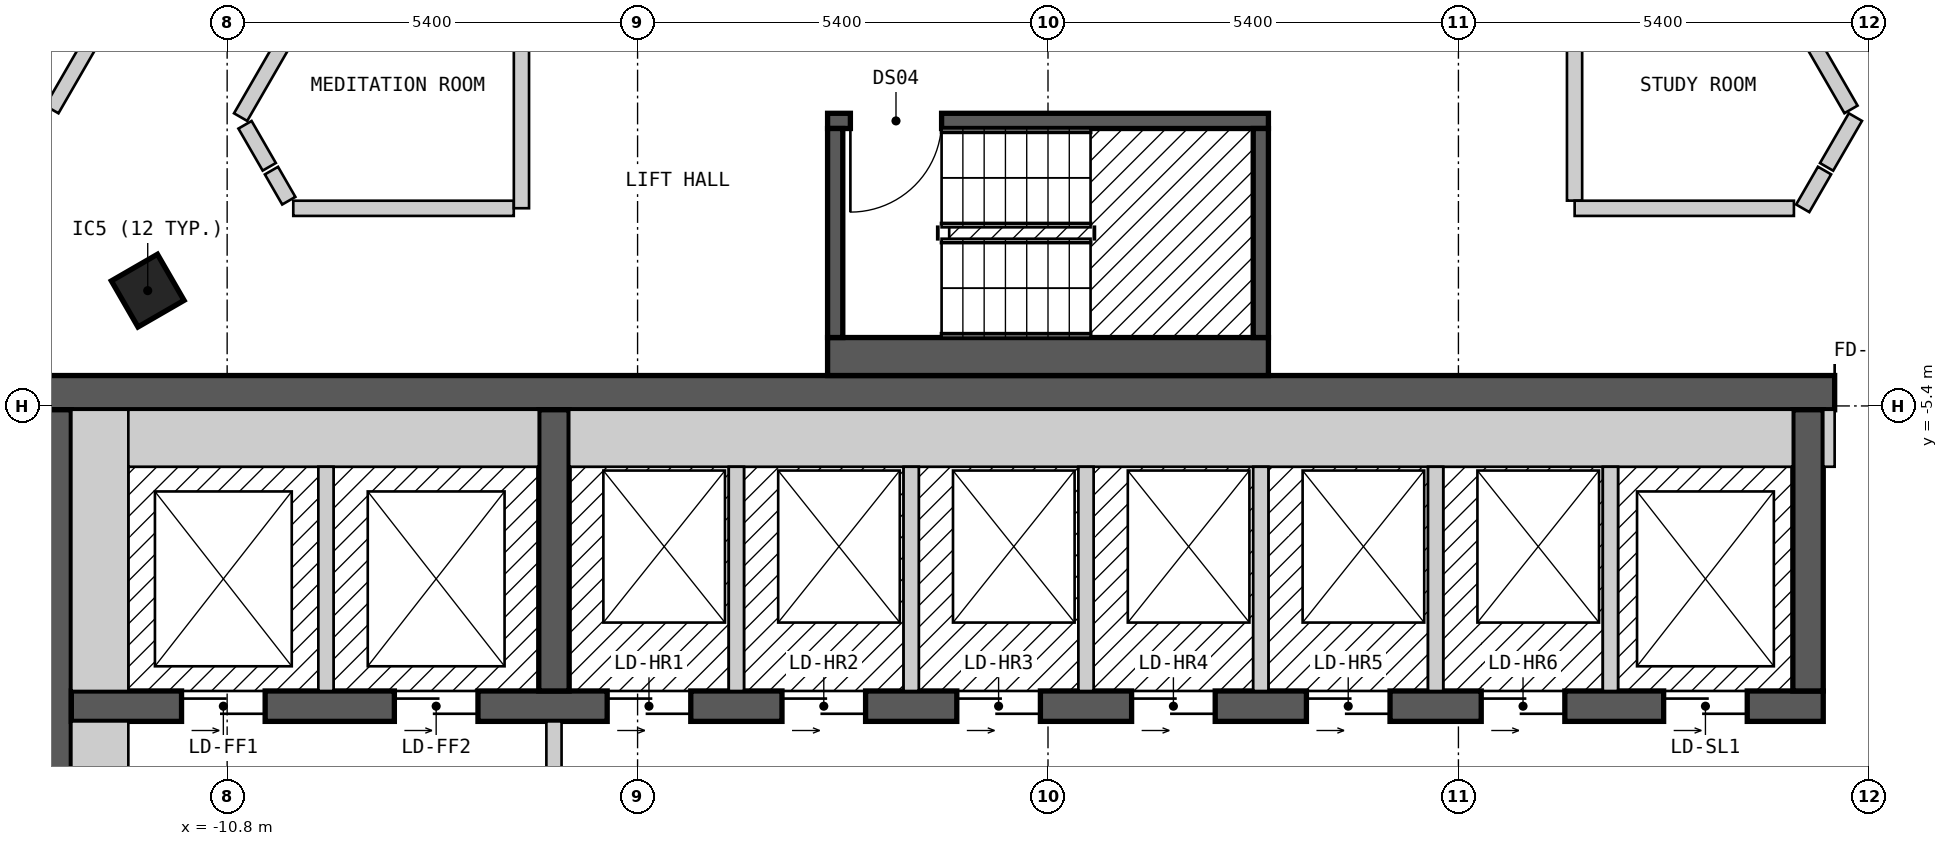
"""IFC4 building model, lengths in metres.
Left out: names, types, materials, properties, quantities, classifications, styles, units other than length and angle.
Written with IfcOpenShell. Run it as: python <this file> out.ifc"""

import sys

from ifc_helpers import new_model, si_unit, direction, frame, frame_2d, origin, origin_2d, place, context, subcontext, project, spatial, rectangle, extrude, element, fill, save


model = new_model("IFC4")
c1 = context("Model", 3, precision=1e-05, world=origin(), true_north=direction((0.0, 1.0)))
c2 = subcontext(c1, "Body", "Model", "MODEL_VIEW")
j1 = project(units=[si_unit("LENGTHUNIT", "METRE"), si_unit("PLANEANGLEUNIT", "RADIAN")], contexts=[c1])
p1 = place(None, origin())
s1 = spatial("IfcSite", under=j1, at=p1, CompositionType="ELEMENT")
p2 = place(p1, origin())
s2 = spatial("IfcBuilding", under=s1, at=p2, CompositionType="ELEMENT")
p3 = place(p2, frame((0.0, 0.0, 220.8)))
s3 = spatial("IfcBuildingStorey", under=s2, at=p3, CompositionType="ELEMENT", Elevation=220.8)
p4 = place(p3, frame((-11.845, -3.883, 0.0), z_axis=(0.0, 0.0, 1.0), x_axis=(0.499984884929, -0.866034130299, 0.0)))
e1 = element("IfcColumn", 1, at=p4, inside=s3, PredefinedType="COLUMN", context=c2, shape_type="SweptSolid", body=[
    extrude(rectangle(XDim=0.7, YDim=0.7, at=origin_2d()), origin(), (0.0, 0.0, 1.0), 3.0),
])
p5 = place(p3, frame((-13.3, -5.225, 0.0), z_axis=(0.0, 0.0, 1.0), x_axis=(1.0, 0.0, 0.0)))
e2 = element("IfcWall", 2, at=p5, inside=s3, PredefinedType="SHEAR", context=c2, shape_type="SweptSolid", body=[
    extrude(rectangle(XDim=26.6, YDim=0.45, at=frame_2d((13.3, 0.0))), origin(), (0.0, 0.0, 1.0), 2.7),
])
p6 = place(p5, frame((23.65, 0.0, 0.0)))
e3 = element("IfcOpeningElement", 3, at=p6, cuts=e2, PredefinedType="OPENING", context=c2, shape_type="SweptSolid", body=[
    extrude(rectangle(XDim=1.2, YDim=2.1, at=frame_2d((0.6, 1.05))), frame((0.0, 0.235, 0.0), z_axis=(0.0, -1.0, 0.0), x_axis=(1.0, 0.0, 0.0)), (0.0, 0.0, 1.0), 0.47),
])
p7 = place(p3, frame((-13.075, -18.55, 0.0), z_axis=(0.0, 0.0, 1.0), x_axis=(0.0, 1.0, 0.0)))
e4 = element("IfcWall", 4, at=p7, inside=s3, PredefinedType="SHEAR", context=c2, shape_type="SweptSolid", body=[
    extrude(rectangle(XDim=13.1, YDim=0.45, at=frame_2d((6.55, 0.0))), origin(), (0.0, 0.0, 1.0), 2.7),
])
p8 = place(p7, frame((4.35, 0.0, 0.0)))
e5 = element("IfcOpeningElement", 5, at=p8, cuts=e4, PredefinedType="OPENING", context=c2, shape_type="SweptSolid", body=[
    extrude(rectangle(XDim=1.2, YDim=2.1, at=frame_2d((0.6, 1.05))), frame((0.0, 0.235, 0.0), z_axis=(0.0, -1.0, 0.0), x_axis=(1.0, 0.0, 0.0)), (0.0, 0.0, 1.0), 0.47),
])
p9 = place(p3, frame((-12.85, -9.35, 0.0), z_axis=(0.0, 0.0, 1.0), x_axis=(1.0, 0.0, 0.0)))
e6 = element("IfcWall", 6, at=p9, inside=s3, PredefinedType="SHEAR", context=c2, shape_type="SweptSolid", body=[
    extrude(rectangle(XDim=23.05, YDim=0.4, at=frame_2d((11.525, 0.0))), origin(), (0.0, 0.0, 1.0), 2.7),
])
p10 = place(p9, frame((1.45, 0.0, 0.0)))
e7 = element("IfcOpeningElement", 7, at=p10, cuts=e6, PredefinedType="OPENING", context=c2, shape_type="SweptSolid", body=[
    extrude(rectangle(XDim=1.1, YDim=2.1, at=frame_2d((0.55, 1.05))), frame((0.0, 0.21, 0.0), z_axis=(0.0, -1.0, 0.0), x_axis=(1.0, 0.0, 0.0)), (0.0, 0.0, 1.0), 0.42),
])
p11 = place(p9, frame((4.25, 0.0, 0.0)))
e8 = element("IfcOpeningElement", 8, at=p11, cuts=e6, PredefinedType="OPENING", context=c2, shape_type="SweptSolid", body=[
    extrude(rectangle(XDim=1.1, YDim=2.1, at=frame_2d((0.55, 1.05))), frame((0.0, 0.21, 0.0), z_axis=(0.0, -1.0, 0.0), x_axis=(1.0, 0.0, 0.0)), (0.0, 0.0, 1.0), 0.42),
])
p12 = place(p9, frame((7.05, 0.0, 0.0)))
e9 = element("IfcOpeningElement", 9, at=p12, cuts=e6, PredefinedType="OPENING", context=c2, shape_type="SweptSolid", body=[
    extrude(rectangle(XDim=1.1, YDim=2.1, at=frame_2d((0.55, 1.05))), frame((0.0, 0.21, 0.0), z_axis=(0.0, -1.0, 0.0), x_axis=(1.0, 0.0, 0.0)), (0.0, 0.0, 1.0), 0.42),
])
p13 = place(p9, frame((9.35, 0.0, 0.0)))
e10 = element("IfcOpeningElement", 10, at=p13, cuts=e6, PredefinedType="OPENING", context=c2, shape_type="SweptSolid", body=[
    extrude(rectangle(XDim=1.1, YDim=2.1, at=frame_2d((0.55, 1.05))), frame((0.0, 0.21, 0.0), z_axis=(0.0, -1.0, 0.0), x_axis=(1.0, 0.0, 0.0)), (0.0, 0.0, 1.0), 0.42),
])
p14 = place(p9, frame((11.65, 0.0, 0.0)))
e11 = element("IfcOpeningElement", 11, at=p14, cuts=e6, PredefinedType="OPENING", context=c2, shape_type="SweptSolid", body=[
    extrude(rectangle(XDim=1.1, YDim=2.1, at=frame_2d((0.55, 1.05))), frame((0.0, 0.21, 0.0), z_axis=(0.0, -1.0, 0.0), x_axis=(1.0, 0.0, 0.0)), (0.0, 0.0, 1.0), 0.42),
])
p15 = place(p9, frame((13.95, 0.0, 0.0)))
e12 = element("IfcOpeningElement", 12, at=p15, cuts=e6, PredefinedType="OPENING", context=c2, shape_type="SweptSolid", body=[
    extrude(rectangle(XDim=1.1, YDim=2.1, at=frame_2d((0.55, 1.05))), frame((0.0, 0.21, 0.0), z_axis=(0.0, -1.0, 0.0), x_axis=(1.0, 0.0, 0.0)), (0.0, 0.0, 1.0), 0.42),
])
p16 = place(p9, frame((16.25, 0.0, 0.0)))
e13 = element("IfcOpeningElement", 13, at=p16, cuts=e6, PredefinedType="OPENING", context=c2, shape_type="SweptSolid", body=[
    extrude(rectangle(XDim=1.1, YDim=2.1, at=frame_2d((0.55, 1.05))), frame((0.0, 0.21, 0.0), z_axis=(0.0, -1.0, 0.0), x_axis=(1.0, 0.0, 0.0)), (0.0, 0.0, 1.0), 0.42),
])
p17 = place(p9, frame((18.55, 0.0, 0.0)))
e14 = element("IfcOpeningElement", 14, at=p17, cuts=e6, PredefinedType="OPENING", context=c2, shape_type="SweptSolid", body=[
    extrude(rectangle(XDim=1.1, YDim=2.1, at=frame_2d((0.55, 1.05))), frame((0.0, 0.21, 0.0), z_axis=(0.0, -1.0, 0.0), x_axis=(1.0, 0.0, 0.0)), (0.0, 0.0, 1.0), 0.42),
])
p18 = place(p9, frame((20.95, 0.0, 0.0)))
e15 = element("IfcOpeningElement", 15, at=p18, cuts=e6, PredefinedType="OPENING", context=c2, shape_type="SweptSolid", body=[
    extrude(rectangle(XDim=1.1, YDim=2.1, at=frame_2d((0.55, 1.05))), frame((0.0, 0.21, 0.0), z_axis=(0.0, -1.0, 0.0), x_axis=(1.0, 0.0, 0.0)), (0.0, 0.0, 1.0), 0.42),
])
for number, where, z_axis, x_axis in (
    (16, (-6.5, -9.15, 0.0), (0.0, 0.0, 1.0), (0.0, 1.0, 0.0)),
    (17, (10.0, -9.15, 0.0), (0.0, 0.0, 1.0), (0.0, 1.0, 0.0)),
):
    element("IfcWall", number, at=place(p3, frame(where, z_axis=z_axis, x_axis=x_axis)), inside=s3, PredefinedType="SHEAR", context=c2, shape_type="SweptSolid", body=[
        extrude(rectangle(XDim=3.7, YDim=0.4, at=frame_2d((1.85, 0.0))), origin(), (0.0, 0.0, 1.0), 2.7),
    ])
p19 = place(p3, frame((-2.9, -4.75, 0.0), z_axis=(0.0, 0.0, 1.0), x_axis=(1.0, 0.0, 0.0)))
e18 = element("IfcWall", 18, at=p19, inside=s3, PredefinedType="SOLIDWALL", context=c2, shape_type="SweptSolid", body=[
    extrude(rectangle(XDim=5.8, YDim=0.5, at=frame_2d((2.9, 0.0))), origin(), (0.0, 0.0, 1.0), 2.7),
])
p20 = place(p3, frame((-2.9, -1.65, 0.0), z_axis=(0.0, 0.0, 1.0), x_axis=(1.0, 0.0, 0.0)))
e19 = element("IfcWall", 19, at=p20, inside=s3, PredefinedType="SOLIDWALL", context=c2, shape_type="SweptSolid", body=[
    extrude(rectangle(XDim=5.8, YDim=0.2, at=frame_2d((2.9, 0.0))), origin(), (0.0, 0.0, 1.0), 2.7),
])
p21 = place(p20, frame((0.3, 0.0, 0.0)))
e20 = element("IfcOpeningElement", 20, at=p21, cuts=e19, PredefinedType="OPENING", context=c2, shape_type="SweptSolid", body=[
    extrude(rectangle(XDim=1.2, YDim=2.1, at=frame_2d((0.6, 1.05))), frame((0.0, 0.11, 0.0), z_axis=(0.0, -1.0, 0.0), x_axis=(1.0, 0.0, 0.0)), (0.0, 0.0, 1.0), 0.22),
])
for number, where, z_axis, x_axis in (
    (21, (-2.8, -4.5, 0.0), (0.0, 0.0, 1.0), (0.0, 1.0, 0.0)),
    (22, (2.8, -4.5, 0.0), (0.0, 0.0, 1.0), (0.0, 1.0, 0.0)),
):
    element("IfcWall", number, at=place(p3, frame(where, z_axis=z_axis, x_axis=x_axis)), inside=s3, PredefinedType="SOLIDWALL", context=c2, shape_type="SweptSolid", body=[
        extrude(rectangle(XDim=2.75, YDim=0.2, at=frame_2d((1.375, 0.0))), origin(), (0.0, 0.0, 1.0), 2.7),
    ])
p22 = place(p3, frame((-10.565, -1.701, 0.0), z_axis=(0.0, 0.0, 1.0), x_axis=(0.499512735409, -0.866306543416, 0.0)))
e23 = element("IfcWall", 23, at=p22, inside=s3, PredefinedType="PARTITIONING", context=c2, shape_type="SweptSolid", body=[
    extrude(rectangle(XDim=0.638, YDim=0.2, at=frame_2d((0.319, 0.0))), origin(), (0.0, 0.0, 1.0), 2.7),
])
p23 = place(p3, frame((-10.217, -2.304, 0.0), z_axis=(0.0, 0.0, 1.0), x_axis=(0.499013081552, -0.866594452117, 0.0)))
e24 = element("IfcWall", 24, at=p23, inside=s3, PredefinedType="PARTITIONING", context=c2, shape_type="SweptSolid", body=[
    extrude(rectangle(XDim=0.457, YDim=0.2, at=frame_2d((0.229, 0.0))), origin(), (0.0, 0.0, 1.0), 2.7),
])
p24 = place(p3, frame((8.026, 2.899, 0.0), z_axis=(0.0, 0.0, 1.0), x_axis=(0.499986018985, -0.866033475577, 0.0)))
e25 = element("IfcWall", 25, at=p24, inside=s3, PredefinedType="PARTITIONING", context=c2, shape_type="SweptSolid", body=[
    extrude(rectangle(XDim=5.078, YDim=0.2, at=frame_2d((2.539, 0.0))), origin(), (0.0, 0.0, 1.0), 2.7),
])
p25 = place(p24, frame((2.089, 0.0, 0.0)))
e26 = element("IfcOpeningElement", 26, at=p25, cuts=e25, PredefinedType="OPENING", context=c2, shape_type="SweptSolid", body=[
    extrude(rectangle(XDim=0.9, YDim=2.1, at=frame_2d((0.45, 1.05))), frame((0.0, 0.11, 0.0), z_axis=(0.0, -1.0, 0.0), x_axis=(1.0, 0.0, 0.0)), (0.0, 0.0, 1.0), 0.22),
])
p26 = place(p3, frame((9.238, 5.2, 0.0), z_axis=(0.0, 0.0, 1.0), x_axis=(0.500025705601, -0.86601056214, 0.0)))
e27 = element("IfcWall", 27, at=p26, inside=s3, PredefinedType="PARTITIONING", context=c2, shape_type="SweptSolid", body=[
    extrude(rectangle(XDim=7.735, YDim=0.2, at=frame_2d((3.868, 0.0))), origin(), (0.0, 0.0, 1.0), 2.7),
])
p27 = place(p3, frame((6.928, 1.0, 0.0), z_axis=(0.0, 0.0, 1.0), x_axis=(0.0, -1.0, 0.0)))
e28 = element("IfcWall", 28, at=p27, inside=s3, PredefinedType="PARTITIONING", context=c2, shape_type="SweptSolid", body=[
    extrude(rectangle(XDim=3.699, YDim=0.2, at=frame_2d((1.85, 0.0))), origin(), (0.0, 0.0, 1.0), 2.7),
])
p28 = place(p3, frame((-9.93, -2.8, 0.0), z_axis=(0.0, 0.0, 1.0), x_axis=(1.0, 0.0, 0.0)))
e29 = element("IfcWall", 29, at=p28, inside=s3, PredefinedType="PARTITIONING", context=c2, shape_type="SweptSolid", body=[
    extrude(rectangle(XDim=2.901, YDim=0.2, at=frame_2d((1.45, 0.0))), origin(), (0.0, 0.0, 1.0), 2.7),
])
p29 = place(p3, frame((6.929, -2.8, 0.0), z_axis=(0.0, 0.0, 1.0), x_axis=(1.0, 0.0, 0.0)))
e30 = element("IfcWall", 30, at=p29, inside=s3, PredefinedType="PARTITIONING", context=c2, shape_type="SweptSolid", body=[
    extrude(rectangle(XDim=2.885, YDim=0.2, at=frame_2d((1.442, 0.0))), origin(), (0.0, 0.0, 1.0), 2.7),
])
p30 = place(p3, frame((9.93, -2.8, 0.0), z_axis=(0.0, 0.0, 1.0), x_axis=(0.500164219654, 0.865930570761, 0.0)))
e31 = element("IfcWall", 31, at=p30, inside=s3, PredefinedType="PARTITIONING", context=c2, shape_type="SweptSolid", body=[
    extrude(rectangle(XDim=0.574, YDim=0.2, at=frame_2d((0.287, 0.0))), origin(), (0.0, 0.0, 1.0), 2.7),
])
p31 = place(p3, frame((10.244, -2.255, 0.0), z_axis=(0.0, 0.0, 1.0), x_axis=(0.50109986513, 0.865389464442, 0.0)))
e32 = element("IfcWall", 32, at=p31, inside=s3, PredefinedType="PARTITIONING", context=c2, shape_type="SweptSolid", body=[
    extrude(rectangle(XDim=0.757, YDim=0.2, at=frame_2d((0.378, 0.0))), origin(), (0.0, 0.0, 1.0), 2.7),
])
p32 = place(p3, frame((-10.623, -1.6, 0.0), z_axis=(0.0, 0.0, 1.0), x_axis=(0.500040865889, 0.866001808567, 0.0)))
e33 = element("IfcWall", 33, at=p32, inside=s3, PredefinedType="PARTITIONING", context=c2, shape_type="SweptSolid", body=[
    extrude(rectangle(XDim=5.31, YDim=0.2, at=frame_2d((2.655, 0.0))), origin(), (0.0, 0.0, 1.0), 2.7),
])
p33 = place(p32, frame((2.205, 0.0, 0.0)))
e34 = element("IfcOpeningElement", 34, at=p33, cuts=e33, PredefinedType="OPENING", context=c2, shape_type="SweptSolid", body=[
    extrude(rectangle(XDim=0.9, YDim=2.1, at=frame_2d((0.45, 1.05))), frame((0.0, 0.11, 0.0), z_axis=(0.0, -1.0, 0.0), x_axis=(1.0, 0.0, 0.0)), (0.0, 0.0, 1.0), 0.22),
])
p34 = place(p3, frame((-13.106, -1.5, 0.0), z_axis=(0.0, 0.0, 1.0), x_axis=(0.500025705601, 0.86601056214, 0.0)))
e35 = element("IfcWall", 35, at=p34, inside=s3, PredefinedType="PARTITIONING", context=c2, shape_type="SweptSolid", body=[
    extrude(rectangle(XDim=7.735, YDim=0.2, at=frame_2d((3.868, 0.0))), origin(), (0.0, 0.0, 1.0), 2.7),
])
p35 = place(p3, frame((-6.928, -2.799, 0.0), z_axis=(0.0, 0.0, 1.0), x_axis=(0.0, 1.0, 0.0)))
e36 = element("IfcWall", 36, at=p35, inside=s3, PredefinedType="PARTITIONING", context=c2, shape_type="SweptSolid", body=[
    extrude(rectangle(XDim=3.999, YDim=0.2, at=frame_2d((2.0, 0.0))), origin(), (0.0, 0.0, 1.0), 2.7),
])
p36 = place(p3, frame((-12.475, -13.0, 0.0), z_axis=(0.0, 0.0, 1.0), x_axis=(0.0, 1.0, 0.0)))
e37 = element("IfcWall", 37, at=p36, inside=s3, PredefinedType="PARTITIONING", context=c2, shape_type="SweptSolid", body=[
    extrude(rectangle(XDim=3.45, YDim=0.75, at=frame_2d((1.725, 0.0))), origin(), (0.0, 0.0, 1.0), 2.7),
])
p37 = place(p3, frame((-12.475, -9.15, 0.0), z_axis=(0.0, 0.0, 1.0), x_axis=(0.0, 1.0, 0.0)))
e38 = element("IfcWall", 38, at=p37, inside=s3, PredefinedType="SOLIDWALL", context=c2, shape_type="SweptSolid", body=[
    extrude(rectangle(XDim=3.7, YDim=0.75, at=frame_2d((1.85, 0.0))), origin(), (0.0, 0.0, 1.0), 2.7),
])
p38 = place(p3, frame((-12.1, -5.825, 0.0), z_axis=(0.0, 0.0, 1.0), x_axis=(1.0, 0.0, 0.0)))
e39 = element("IfcWall", 39, at=p38, inside=s3, PredefinedType="SOLIDWALL", context=c2, shape_type="SweptSolid", body=[
    extrude(rectangle(XDim=5.4, YDim=0.75, at=frame_2d((2.7, 0.0))), origin(), (0.0, 0.0, 1.0), 2.7),
])
p39 = place(p3, frame((-9.5, -9.15, 0.0), z_axis=(0.0, 0.0, 1.0), x_axis=(0.0, 1.0, 0.0)))
e40 = element("IfcWall", 40, at=p39, inside=s3, PredefinedType="SOLIDWALL", context=c2, shape_type="SweptSolid", body=[
    extrude(rectangle(XDim=2.95, YDim=0.2, at=frame_2d((1.475, 0.0))), origin(), (0.0, 0.0, 1.0), 2.7),
])
p40 = place(p3, frame((-6.5, -14.45, 0.0), z_axis=(0.0, 0.0, 1.0), x_axis=(0.0, 1.0, 0.0)))
e41 = element("IfcWall", 41, at=p40, inside=s3, PredefinedType="PARTITIONING", context=c2, shape_type="SweptSolid", body=[
    extrude(rectangle(XDim=4.9, YDim=0.2, at=frame_2d((2.45, 0.0))), origin(), (0.0, 0.0, 1.0), 2.7),
])
p41 = place(p40, frame((3.15, 0.0, 0.0), z_axis=(0.0, 0.0, 1.0), x_axis=(-1.0, 0.0, 0.0)))
e42 = element("IfcOpeningElement", 42, at=p41, cuts=e41, PredefinedType="OPENING", context=c2, shape_type="SweptSolid", body=[
    extrude(rectangle(XDim=1.4, YDim=2.1, at=frame_2d((0.7, 1.05))), frame((0.0, 0.11, 0.0), z_axis=(0.0, -1.0, 0.0), x_axis=(1.0, 0.0, 0.0)), (0.0, 0.0, 1.0), 0.22),
])
p42 = place(p3, frame((-6.3, -5.825, 0.0), z_axis=(0.0, 0.0, 1.0), x_axis=(1.0, 0.0, 0.0)))
e43 = element("IfcWall", 43, at=p42, inside=s3, PredefinedType="SOLIDWALL", context=c2, shape_type="SweptSolid", body=[
    extrude(rectangle(XDim=16.1, YDim=0.75, at=frame_2d((8.05, 0.0))), origin(), (0.0, 0.0, 1.0), 2.7),
])
for number, where, z_axis, x_axis in (
    (44, (-4.1, -9.15, 0.0), (0.0, 0.0, 1.0), (0.0, 1.0, 0.0)),
    (45, (-1.8, -9.15, 0.0), (0.0, 0.0, 1.0), (0.0, 1.0, 0.0)),
    (46, (0.5, -9.15, 0.0), (0.0, 0.0, 1.0), (0.0, 1.0, 0.0)),
    (47, (2.8, -9.15, 0.0), (0.0, 0.0, 1.0), (0.0, 1.0, 0.0)),
    (48, (5.1, -9.15, 0.0), (0.0, 0.0, 1.0), (0.0, 1.0, 0.0)),
    (49, (7.4, -9.15, 0.0), (0.0, 0.0, 1.0), (0.0, 1.0, 0.0)),
):
    element("IfcWall", number, at=place(p3, frame(where, z_axis=z_axis, x_axis=x_axis)), inside=s3, PredefinedType="SOLIDWALL", context=c2, shape_type="SweptSolid", body=[
        extrude(rectangle(XDim=2.95, YDim=0.2, at=frame_2d((1.475, 0.0))), origin(), (0.0, 0.0, 1.0), 2.7),
    ])
p43 = place(p3, frame((10.275, -6.2, 0.0), z_axis=(0.0, 0.0, 1.0), x_axis=(0.0, 1.0, 0.0)))
e50 = element("IfcWall", 50, at=p43, inside=s3, PredefinedType="PARTITIONING", context=c2, shape_type="SweptSolid", body=[
    extrude(rectangle(XDim=0.75, YDim=0.15, at=frame_2d((0.375, 0.0))), origin(), (0.0, 0.0, 1.0), 2.7),
])
p44 = place(p21, origin())
e51 = element("IfcDoor", 51, at=p44, inside=s3, OperationType="SINGLE_SWING_LEFT", PredefinedType="DOOR", context=c2, shape_type="SweptSolid", body=[
    extrude(rectangle(XDim=1.2, YDim=2.1, at=frame_2d((0.6, 1.05))), frame((0.0, 0.025, 0.0), z_axis=(0.0, -1.0, 0.0), x_axis=(1.0, 0.0, 0.0)), (0.0, 0.0, 1.0), 0.05),
])
fill(e20, e51)
p45 = place(p10, origin())
e52 = element("IfcDoor", 52, at=p45, inside=s3, OperationType="DOUBLE_DOOR_SLIDING", PredefinedType="DOOR", context=c2, shape_type="SweptSolid", body=[
    extrude(rectangle(XDim=1.1, YDim=2.1, at=frame_2d((0.55, 1.05))), frame((0.0, 0.025, 0.0), z_axis=(0.0, -1.0, 0.0), x_axis=(1.0, 0.0, 0.0)), (0.0, 0.0, 1.0), 0.05),
])
fill(e7, e52)
p46 = place(p11, origin())
e53 = element("IfcDoor", 53, at=p46, inside=s3, OperationType="DOUBLE_DOOR_SLIDING", PredefinedType="DOOR", context=c2, shape_type="SweptSolid", body=[
    extrude(rectangle(XDim=1.1, YDim=2.1, at=frame_2d((0.55, 1.05))), frame((0.0, 0.025, 0.0), z_axis=(0.0, -1.0, 0.0), x_axis=(1.0, 0.0, 0.0)), (0.0, 0.0, 1.0), 0.05),
])
fill(e8, e53)
p47 = place(p12, origin())
e54 = element("IfcDoor", 54, at=p47, inside=s3, OperationType="DOUBLE_DOOR_SLIDING", PredefinedType="DOOR", context=c2, shape_type="SweptSolid", body=[
    extrude(rectangle(XDim=1.1, YDim=2.1, at=frame_2d((0.55, 1.05))), frame((0.0, 0.025, 0.0), z_axis=(0.0, -1.0, 0.0), x_axis=(1.0, 0.0, 0.0)), (0.0, 0.0, 1.0), 0.05),
])
fill(e9, e54)
p48 = place(p13, origin())
e55 = element("IfcDoor", 55, at=p48, inside=s3, OperationType="DOUBLE_DOOR_SLIDING", PredefinedType="DOOR", context=c2, shape_type="SweptSolid", body=[
    extrude(rectangle(XDim=1.1, YDim=2.1, at=frame_2d((0.55, 1.05))), frame((0.0, 0.025, 0.0), z_axis=(0.0, -1.0, 0.0), x_axis=(1.0, 0.0, 0.0)), (0.0, 0.0, 1.0), 0.05),
])
fill(e10, e55)
p49 = place(p14, origin())
e56 = element("IfcDoor", 56, at=p49, inside=s3, OperationType="DOUBLE_DOOR_SLIDING", PredefinedType="DOOR", context=c2, shape_type="SweptSolid", body=[
    extrude(rectangle(XDim=1.1, YDim=2.1, at=frame_2d((0.55, 1.05))), frame((0.0, 0.025, 0.0), z_axis=(0.0, -1.0, 0.0), x_axis=(1.0, 0.0, 0.0)), (0.0, 0.0, 1.0), 0.05),
])
fill(e11, e56)
p50 = place(p15, origin())
e57 = element("IfcDoor", 57, at=p50, inside=s3, OperationType="DOUBLE_DOOR_SLIDING", PredefinedType="DOOR", context=c2, shape_type="SweptSolid", body=[
    extrude(rectangle(XDim=1.1, YDim=2.1, at=frame_2d((0.55, 1.05))), frame((0.0, 0.025, 0.0), z_axis=(0.0, -1.0, 0.0), x_axis=(1.0, 0.0, 0.0)), (0.0, 0.0, 1.0), 0.05),
])
fill(e12, e57)
p51 = place(p16, origin())
e58 = element("IfcDoor", 58, at=p51, inside=s3, OperationType="DOUBLE_DOOR_SLIDING", PredefinedType="DOOR", context=c2, shape_type="SweptSolid", body=[
    extrude(rectangle(XDim=1.1, YDim=2.1, at=frame_2d((0.55, 1.05))), frame((0.0, 0.025, 0.0), z_axis=(0.0, -1.0, 0.0), x_axis=(1.0, 0.0, 0.0)), (0.0, 0.0, 1.0), 0.05),
])
fill(e13, e58)
p52 = place(p17, origin())
e59 = element("IfcDoor", 59, at=p52, inside=s3, OperationType="DOUBLE_DOOR_SLIDING", PredefinedType="DOOR", context=c2, shape_type="SweptSolid", body=[
    extrude(rectangle(XDim=1.1, YDim=2.1, at=frame_2d((0.55, 1.05))), frame((0.0, 0.025, 0.0), z_axis=(0.0, -1.0, 0.0), x_axis=(1.0, 0.0, 0.0)), (0.0, 0.0, 1.0), 0.05),
])
fill(e14, e59)
p53 = place(p18, origin())
e60 = element("IfcDoor", 60, at=p53, inside=s3, OperationType="DOUBLE_DOOR_SLIDING", PredefinedType="DOOR", context=c2, shape_type="SweptSolid", body=[
    extrude(rectangle(XDim=1.1, YDim=2.1, at=frame_2d((0.55, 1.05))), frame((0.0, 0.025, 0.0), z_axis=(0.0, -1.0, 0.0), x_axis=(1.0, 0.0, 0.0)), (0.0, 0.0, 1.0), 0.05),
])
fill(e15, e60)
p54 = place(p6, origin())
e61 = element("IfcDoor", 61, at=p54, inside=s3, OperationType="DOUBLE_DOOR_SINGLE_SWING", PredefinedType="DOOR", context=c2, shape_type="SweptSolid", body=[
    extrude(rectangle(XDim=1.2, YDim=2.1, at=frame_2d((0.6, 1.05))), frame((0.0, 0.025, 0.0), z_axis=(0.0, -1.0, 0.0), x_axis=(1.0, 0.0, 0.0)), (0.0, 0.0, 1.0), 0.05),
])
fill(e3, e61)
save(model, sys.argv[1])
